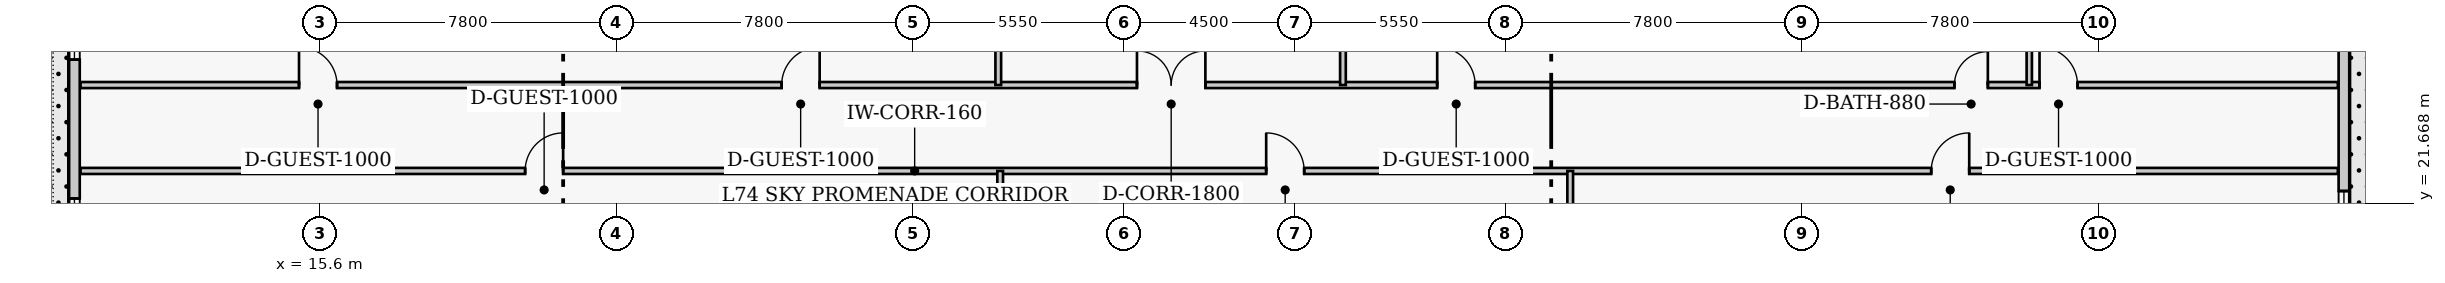
"""IFC4 building model, lengths in metres.
Left out: names, types, materials, properties, quantities, classifications, styles, units other than length and angle.
Written with IfcOpenShell. Run it as: python <this file> out.ifc"""

import sys

from ifc_helpers import new_model, si_unit, direction, frame, frame_2d, origin, place, context, subcontext, project, spatial, rectangle, extrude, element, fill, save


model = new_model("IFC4")
c1 = context("Model", 3, precision=1e-05, world=origin(), true_north=direction((0.0, 1.0)))
c2 = subcontext(c1, "Body", "Model", "MODEL_VIEW")
j1 = project(units=[si_unit("LENGTHUNIT", "METRE"), si_unit("PLANEANGLEUNIT", "RADIAN")], contexts=[c1])
p1 = place(None, origin())
s1 = spatial("IfcSite", under=j1, at=p1, CompositionType="ELEMENT")
p2 = place(p1, origin())
s2 = spatial("IfcBuilding", under=s1, at=p2, CompositionType="ELEMENT")
p3 = place(p2, frame((0.0, 0.0, 297.4)))
s3 = spatial("IfcBuildingStorey", under=s2, at=p3, CompositionType="ELEMENT", Elevation=297.4)
p4 = place(p3, frame((68.86, 14.76, 0.0), z_axis=(0.0, 0.0, 1.0), x_axis=(0.0, 1.0, 0.0)))
e1 = element("IfcWall", 1, at=p4, inside=s3, PredefinedType="SOLIDWALL", context=c2, shape_type="SweptSolid", body=[
    extrude(rectangle(XDim=27.68, YDim=0.28, at=frame_2d((13.84, 0.0))), origin(), (0.0, 0.0, 1.0), 4.31),
])
p5 = place(p4, frame((0.677, 0.0, 0.65)))
e2 = element("IfcOpeningElement", 2, at=p5, cuts=e1, PredefinedType="OPENING", context=c2, shape_type="SweptSolid", body=[
    extrude(rectangle(XDim=2.6, YDim=2.2, at=frame_2d((1.3, 1.1))), frame((0.0, 0.15, 0.0), z_axis=(0.0, -1.0, 0.0), x_axis=(1.0, 0.0, 0.0)), (0.0, 0.0, 1.0), 0.3),
])
p6 = place(p4, frame((4.631, 0.0, 0.65)))
e3 = element("IfcOpeningElement", 3, at=p6, cuts=e1, PredefinedType="OPENING", context=c2, shape_type="SweptSolid", body=[
    extrude(rectangle(XDim=2.6, YDim=2.2, at=frame_2d((1.3, 1.1))), frame((0.0, 0.15, 0.0), z_axis=(0.0, -1.0, 0.0), x_axis=(1.0, 0.0, 0.0)), (0.0, 0.0, 1.0), 0.3),
])
p7 = place(p4, frame((12.54, 0.0, 0.65)))
e4 = element("IfcOpeningElement", 4, at=p7, cuts=e1, PredefinedType="OPENING", context=c2, shape_type="SweptSolid", body=[
    extrude(rectangle(XDim=2.6, YDim=2.2, at=frame_2d((1.3, 1.1))), frame((0.0, 0.15, 0.0), z_axis=(0.0, -1.0, 0.0), x_axis=(1.0, 0.0, 0.0)), (0.0, 0.0, 1.0), 0.3),
])
p8 = place(p4, frame((16.494, 0.0, 0.65)))
e5 = element("IfcOpeningElement", 5, at=p8, cuts=e1, PredefinedType="OPENING", context=c2, shape_type="SweptSolid", body=[
    extrude(rectangle(XDim=2.6, YDim=2.2, at=frame_2d((1.3, 1.1))), frame((0.0, 0.15, 0.0), z_axis=(0.0, -1.0, 0.0), x_axis=(1.0, 0.0, 0.0)), (0.0, 0.0, 1.0), 0.3),
])
p9 = place(p4, frame((20.448, 0.0, 0.65)))
e6 = element("IfcOpeningElement", 6, at=p9, cuts=e1, PredefinedType="OPENING", context=c2, shape_type="SweptSolid", body=[
    extrude(rectangle(XDim=2.6, YDim=2.2, at=frame_2d((1.3, 1.1))), frame((0.0, 0.15, 0.0), z_axis=(0.0, -1.0, 0.0), x_axis=(1.0, 0.0, 0.0)), (0.0, 0.0, 1.0), 0.3),
])
p10 = place(p4, frame((24.403, 0.0, 0.65)))
e7 = element("IfcOpeningElement", 7, at=p10, cuts=e1, PredefinedType="OPENING", context=c2, shape_type="SweptSolid", body=[
    extrude(rectangle(XDim=2.6, YDim=2.2, at=frame_2d((1.3, 1.1))), frame((0.0, 0.15, 0.0), z_axis=(0.0, -1.0, 0.0), x_axis=(1.0, 0.0, 0.0)), (0.0, 0.0, 1.0), 0.3),
])
p11 = place(p3, frame((9.14, 39.44, 0.0), z_axis=(0.0, 0.0, 1.0), x_axis=(0.0, -1.0, 0.0)))
e8 = element("IfcWall", 8, at=p11, inside=s3, PredefinedType="SOLIDWALL", context=c2, shape_type="SweptSolid", body=[
    extrude(rectangle(XDim=27.68, YDim=0.28, at=frame_2d((13.84, 0.0))), origin(), (0.0, 0.0, 1.0), 4.31),
])
p12 = place(p11, frame((0.677, 0.0, 0.65)))
e9 = element("IfcOpeningElement", 9, at=p12, cuts=e8, PredefinedType="OPENING", context=c2, shape_type="SweptSolid", body=[
    extrude(rectangle(XDim=2.6, YDim=2.2, at=frame_2d((1.3, 1.1))), frame((0.0, 0.15, 0.0), z_axis=(0.0, -1.0, 0.0), x_axis=(1.0, 0.0, 0.0)), (0.0, 0.0, 1.0), 0.3),
])
p13 = place(p11, frame((4.631, 0.0, 0.65)))
e10 = element("IfcOpeningElement", 10, at=p13, cuts=e8, PredefinedType="OPENING", context=c2, shape_type="SweptSolid", body=[
    extrude(rectangle(XDim=2.6, YDim=2.2, at=frame_2d((1.3, 1.1))), frame((0.0, 0.15, 0.0), z_axis=(0.0, -1.0, 0.0), x_axis=(1.0, 0.0, 0.0)), (0.0, 0.0, 1.0), 0.3),
])
p14 = place(p11, frame((8.586, 0.0, 0.65)))
e11 = element("IfcOpeningElement", 11, at=p14, cuts=e8, PredefinedType="OPENING", context=c2, shape_type="SweptSolid", body=[
    extrude(rectangle(XDim=2.6, YDim=2.2, at=frame_2d((1.3, 1.1))), frame((0.0, 0.15, 0.0), z_axis=(0.0, -1.0, 0.0), x_axis=(1.0, 0.0, 0.0)), (0.0, 0.0, 1.0), 0.3),
])
p15 = place(p11, frame((11.39, 0.0, 0.65)))
e12 = element("IfcOpeningElement", 12, at=p15, cuts=e8, PredefinedType="OPENING", context=c2, shape_type="SweptSolid", body=[
    extrude(rectangle(XDim=2.6, YDim=2.2, at=frame_2d((1.3, 1.1))), frame((0.0, 0.15, 0.0), z_axis=(0.0, -1.0, 0.0), x_axis=(1.0, 0.0, 0.0)), (0.0, 0.0, 1.0), 0.3),
])
p16 = place(p11, frame((17.644, 0.0, 0.65)))
e13 = element("IfcOpeningElement", 13, at=p16, cuts=e8, PredefinedType="OPENING", context=c2, shape_type="SweptSolid", body=[
    extrude(rectangle(XDim=2.6, YDim=2.2, at=frame_2d((1.3, 1.1))), frame((0.0, 0.15, 0.0), z_axis=(0.0, -1.0, 0.0), x_axis=(1.0, 0.0, 0.0)), (0.0, 0.0, 1.0), 0.3),
])
p17 = place(p11, frame((20.448, 0.0, 0.65)))
e14 = element("IfcOpeningElement", 14, at=p17, cuts=e8, PredefinedType="OPENING", context=c2, shape_type="SweptSolid", body=[
    extrude(rectangle(XDim=2.6, YDim=2.2, at=frame_2d((1.3, 1.1))), frame((0.0, 0.15, 0.0), z_axis=(0.0, -1.0, 0.0), x_axis=(1.0, 0.0, 0.0)), (0.0, 0.0, 1.0), 0.3),
])
p18 = place(p11, frame((24.403, 0.0, 0.65)))
e15 = element("IfcOpeningElement", 15, at=p18, cuts=e8, PredefinedType="OPENING", context=c2, shape_type="SweptSolid", body=[
    extrude(rectangle(XDim=2.6, YDim=2.2, at=frame_2d((1.3, 1.1))), frame((0.0, 0.15, 0.0), z_axis=(0.0, -1.0, 0.0), x_axis=(1.0, 0.0, 0.0)), (0.0, 0.0, 1.0), 0.3),
])
p19 = place(p3, frame((9.3, 22.52, 0.0), z_axis=(0.0, 0.0, 1.0), x_axis=(1.0, 0.0, 0.0)))
e16 = element("IfcWall", 16, at=p19, inside=s3, PredefinedType="PARTITIONING", context=c2, shape_type="SweptSolid", body=[
    extrude(rectangle(XDim=59.4, YDim=0.16, at=frame_2d((29.7, 0.0))), origin(), (0.0, 0.0, 1.0), 4.31),
])
p20 = place(p19, frame((11.7, 0.0, 0.0)))
e17 = element("IfcOpeningElement", 17, at=p20, cuts=e16, PredefinedType="OPENING", context=c2, shape_type="SweptSolid", body=[
    extrude(rectangle(XDim=1.0, YDim=2.15, at=frame_2d((0.5, 1.075))), frame((0.0, 0.09, 0.0), z_axis=(0.0, -1.0, 0.0), x_axis=(1.0, 0.0, 0.0)), (0.0, 0.0, 1.0), 0.18),
])
p21 = place(p19, frame((31.2, 0.0, 0.0)))
e18 = element("IfcOpeningElement", 18, at=p21, cuts=e16, PredefinedType="OPENING", context=c2, shape_type="SweptSolid", body=[
    extrude(rectangle(XDim=1.0, YDim=2.15, at=frame_2d((0.5, 1.075))), frame((0.0, 0.09, 0.0), z_axis=(0.0, -1.0, 0.0), x_axis=(1.0, 0.0, 0.0)), (0.0, 0.0, 1.0), 0.18),
])
p22 = place(p19, frame((48.7, 0.0, 0.0)))
e19 = element("IfcOpeningElement", 19, at=p22, cuts=e16, PredefinedType="OPENING", context=c2, shape_type="SweptSolid", body=[
    extrude(rectangle(XDim=1.0, YDim=2.15, at=frame_2d((0.5, 1.075))), frame((0.0, 0.09, 0.0), z_axis=(0.0, -1.0, 0.0), x_axis=(1.0, 0.0, 0.0)), (0.0, 0.0, 1.0), 0.18),
])
p23 = place(p3, frame((9.3, 24.78, 0.0), z_axis=(0.0, 0.0, 1.0), x_axis=(1.0, 0.0, 0.0)))
e20 = element("IfcWall", 20, at=p23, inside=s3, PredefinedType="PARTITIONING", context=c2, shape_type="SweptSolid", body=[
    extrude(rectangle(XDim=59.4, YDim=0.16, at=frame_2d((29.7, 0.0))), origin(), (0.0, 0.0, 1.0), 4.31),
])
p24 = place(p23, frame((27.8, 0.0, 0.0)))
e21 = element("IfcOpeningElement", 21, at=p24, cuts=e20, PredefinedType="OPENING", context=c2, shape_type="SweptSolid", body=[
    extrude(rectangle(XDim=1.8, YDim=2.2, at=frame_2d((0.9, 1.1))), frame((0.0, 0.09, 0.0), z_axis=(0.0, -1.0, 0.0), x_axis=(1.0, 0.0, 0.0)), (0.0, 0.0, 1.0), 0.18),
])
p25 = place(p23, frame((18.45, 0.0, 0.0)))
e22 = element("IfcOpeningElement", 22, at=p25, cuts=e20, PredefinedType="OPENING", context=c2, shape_type="SweptSolid", body=[
    extrude(rectangle(XDim=1.0, YDim=2.15, at=frame_2d((0.5, 1.075))), frame((0.0, 0.09, 0.0), z_axis=(0.0, -1.0, 0.0), x_axis=(1.0, 0.0, 0.0)), (0.0, 0.0, 1.0), 0.18),
])
p26 = place(p23, frame((35.7, 0.0, 0.0)))
e23 = element("IfcOpeningElement", 23, at=p26, cuts=e20, PredefinedType="OPENING", context=c2, shape_type="SweptSolid", body=[
    extrude(rectangle(XDim=1.0, YDim=2.15, at=frame_2d((0.5, 1.075))), frame((0.0, 0.09, 0.0), z_axis=(0.0, -1.0, 0.0), x_axis=(1.0, 0.0, 0.0)), (0.0, 0.0, 1.0), 0.18),
])
p27 = place(p23, frame((5.75, 0.0, 0.0)))
e24 = element("IfcOpeningElement", 24, at=p27, cuts=e20, PredefinedType="OPENING", context=c2, shape_type="SweptSolid", body=[
    extrude(rectangle(XDim=1.0, YDim=2.15, at=frame_2d((0.5, 1.075))), frame((0.0, 0.09, 0.0), z_axis=(0.0, -1.0, 0.0), x_axis=(1.0, 0.0, 0.0)), (0.0, 0.0, 1.0), 0.18),
])
p28 = place(p23, frame((49.31, 0.0, 0.0)))
e25 = element("IfcOpeningElement", 25, at=p28, cuts=e20, PredefinedType="OPENING", context=c2, shape_type="SweptSolid", body=[
    extrude(rectangle(XDim=0.88, YDim=2.05, at=frame_2d((0.44, 1.025))), frame((0.0, 0.09, 0.0), z_axis=(0.0, -1.0, 0.0), x_axis=(1.0, 0.0, 0.0)), (0.0, 0.0, 1.0), 0.18),
])
p29 = place(p23, frame((51.55, 0.0, 0.0)))
e26 = element("IfcOpeningElement", 26, at=p29, cuts=e20, PredefinedType="OPENING", context=c2, shape_type="SweptSolid", body=[
    extrude(rectangle(XDim=1.0, YDim=2.15, at=frame_2d((0.5, 1.075))), frame((0.0, 0.09, 0.0), z_axis=(0.0, -1.0, 0.0), x_axis=(1.0, 0.0, 0.0)), (0.0, 0.0, 1.0), 0.18),
])
for number, where, z_axis, x_axis in (
    (27, (33.45, 24.78, 0.0), (0.0, 0.0, 1.0), (0.0, 1.0, 0.0)),
    (28, (42.52, 24.78, 0.0), (0.0, 0.0, 1.0), (0.0, 1.0, 0.0)),
):
    element("IfcWall", number, at=place(p3, frame(where, z_axis=z_axis, x_axis=x_axis)), inside=s3, PredefinedType="PARTITIONING", context=c2, shape_type="SweptSolid", body=[
        extrude(rectangle(XDim=4.77, YDim=0.15, at=frame_2d((2.385, 0.0))), origin(), (0.0, 0.0, 1.0), 4.31),
    ])
p30 = place(p3, frame((33.5, 8.2, 0.0), z_axis=(0.0, 0.0, 1.0), x_axis=(0.0, 1.0, 0.0)))
e29 = element("IfcWall", 29, at=p30, inside=s3, PredefinedType="PARTITIONING", context=c2, shape_type="SweptSolid", body=[
    extrude(rectangle(XDim=14.32, YDim=0.15, at=frame_2d((7.16, 0.0))), origin(), (0.0, 0.0, 1.0), 4.31),
])
p31 = place(p3, frame((48.5, 9.72, 0.0), z_axis=(0.0, 0.0, 1.0), x_axis=(0.0, 1.0, 0.0)))
e30 = element("IfcWall", 30, at=p31, inside=s3, PredefinedType="PARTITIONING", context=c2, shape_type="SweptSolid", body=[
    extrude(rectangle(XDim=12.8, YDim=0.15, at=frame_2d((6.4, 0.0))), origin(), (0.0, 0.0, 1.0), 3.906),
])
p32 = place(p3, frame((60.58, 24.78, 0.0), z_axis=(0.0, 0.0, 1.0), x_axis=(0.0, 1.0, 0.0)))
e31 = element("IfcWall", 31, at=p32, inside=s3, PredefinedType="PLUMBINGWALL", context=c2, shape_type="SweptSolid", body=[
    extrude(rectangle(XDim=7.32, YDim=0.14, at=frame_2d((3.66, 0.0))), origin(), (0.0, 0.0, 1.0), 4.31),
])
p33 = place(p6, origin())
e32 = element("IfcWindow", 32, at=p33, inside=s3, PartitioningType="SINGLE_PANEL", PredefinedType="WINDOW", context=c2, shape_type="SweptSolid", body=[
    extrude(rectangle(XDim=2.6, YDim=2.2, at=frame_2d((1.3, 1.1))), frame((0.0, 0.03, 0.0), z_axis=(0.0, -1.0, 0.0), x_axis=(1.0, 0.0, 0.0)), (0.0, 0.0, 1.0), 0.06),
])
fill(e3, e32)
p34 = place(p15, origin())
e33 = element("IfcWindow", 33, at=p34, inside=s3, PartitioningType="SINGLE_PANEL", PredefinedType="WINDOW", context=c2, shape_type="SweptSolid", body=[
    extrude(rectangle(XDim=2.6, YDim=2.2, at=frame_2d((1.3, 1.1))), frame((0.0, 0.03, 0.0), z_axis=(0.0, -1.0, 0.0), x_axis=(1.0, 0.0, 0.0)), (0.0, 0.0, 1.0), 0.06),
])
fill(e12, e33)
p35 = place(p16, origin())
e34 = element("IfcWindow", 34, at=p35, inside=s3, PartitioningType="SINGLE_PANEL", PredefinedType="WINDOW", context=c2, shape_type="SweptSolid", body=[
    extrude(rectangle(XDim=2.6, YDim=2.2, at=frame_2d((1.3, 1.1))), frame((0.0, 0.03, 0.0), z_axis=(0.0, -1.0, 0.0), x_axis=(1.0, 0.0, 0.0)), (0.0, 0.0, 1.0), 0.06),
])
fill(e13, e34)
p36 = place(p24, origin())
e35 = element("IfcDoor", 35, at=p36, inside=s3, OperationType="DOUBLE_DOOR_SINGLE_SWING", PredefinedType="DOOR", context=c2, shape_type="SweptSolid", body=[
    extrude(rectangle(XDim=1.8, YDim=2.2, at=frame_2d((0.9, 1.1))), frame((0.0, 0.025, 0.0), z_axis=(0.0, -1.0, 0.0), x_axis=(1.0, 0.0, 0.0)), (0.0, 0.0, 1.0), 0.05),
])
fill(e21, e35)
p37 = place(p25, origin())
e36 = element("IfcDoor", 36, at=p37, inside=s3, OperationType="SINGLE_SWING_RIGHT", PredefinedType="DOOR", context=c2, shape_type="SweptSolid", body=[
    extrude(rectangle(XDim=1.0, YDim=2.15, at=frame_2d((0.5, 1.075))), frame((0.0, 0.025, 0.0), z_axis=(0.0, -1.0, 0.0), x_axis=(1.0, 0.0, 0.0)), (0.0, 0.0, 1.0), 0.05),
])
fill(e22, e36)
p38 = place(p26, origin())
e37 = element("IfcDoor", 37, at=p38, inside=s3, OperationType="SINGLE_SWING_LEFT", PredefinedType="DOOR", context=c2, shape_type="SweptSolid", body=[
    extrude(rectangle(XDim=1.0, YDim=2.15, at=frame_2d((0.5, 1.075))), frame((0.0, 0.025, 0.0), z_axis=(0.0, -1.0, 0.0), x_axis=(1.0, 0.0, 0.0)), (0.0, 0.0, 1.0), 0.05),
])
fill(e23, e37)
p39 = place(p20, origin())
e38 = element("IfcDoor", 38, at=p39, inside=s3, OperationType="SINGLE_SWING_RIGHT", PredefinedType="DOOR", context=c2, shape_type="SweptSolid", body=[
    extrude(rectangle(XDim=1.0, YDim=2.15, at=frame_2d((0.5, 1.075))), frame((0.0, 0.025, 0.0), z_axis=(0.0, -1.0, 0.0), x_axis=(1.0, 0.0, 0.0)), (0.0, 0.0, 1.0), 0.05),
])
fill(e17, e38)
p40 = place(p21, origin())
e39 = element("IfcDoor", 39, at=p40, inside=s3, OperationType="SINGLE_SWING_LEFT", PredefinedType="DOOR", context=c2, shape_type="SweptSolid", body=[
    extrude(rectangle(XDim=1.0, YDim=2.15, at=frame_2d((0.5, 1.075))), frame((0.0, 0.025, 0.0), z_axis=(0.0, -1.0, 0.0), x_axis=(1.0, 0.0, 0.0)), (0.0, 0.0, 1.0), 0.05),
])
fill(e18, e39)
p41 = place(p22, origin())
e40 = element("IfcDoor", 40, at=p41, inside=s3, OperationType="SINGLE_SWING_RIGHT", PredefinedType="DOOR", context=c2, shape_type="SweptSolid", body=[
    extrude(rectangle(XDim=1.0, YDim=2.15, at=frame_2d((0.5, 1.075))), frame((0.0, 0.025, 0.0), z_axis=(0.0, -1.0, 0.0), x_axis=(1.0, 0.0, 0.0)), (0.0, 0.0, 1.0), 0.05),
])
fill(e19, e40)
p42 = place(p27, origin())
e41 = element("IfcDoor", 41, at=p42, inside=s3, OperationType="SINGLE_SWING_LEFT", PredefinedType="DOOR", context=c2, shape_type="SweptSolid", body=[
    extrude(rectangle(XDim=1.0, YDim=2.15, at=frame_2d((0.5, 1.075))), frame((0.0, 0.025, 0.0), z_axis=(0.0, -1.0, 0.0), x_axis=(1.0, 0.0, 0.0)), (0.0, 0.0, 1.0), 0.05),
])
fill(e24, e41)
p43 = place(p28, origin())
e42 = element("IfcDoor", 42, at=p43, inside=s3, OperationType="SINGLE_SWING_RIGHT", PredefinedType="DOOR", context=c2, shape_type="SweptSolid", body=[
    extrude(rectangle(XDim=0.88, YDim=2.05, at=frame_2d((0.44, 1.025))), frame((0.0, 0.025, 0.0), z_axis=(0.0, -1.0, 0.0), x_axis=(1.0, 0.0, 0.0)), (0.0, 0.0, 1.0), 0.05),
])
fill(e25, e42)
p44 = place(p29, origin())
e43 = element("IfcDoor", 43, at=p44, inside=s3, OperationType="SINGLE_SWING_LEFT", PredefinedType="DOOR", context=c2, shape_type="SweptSolid", body=[
    extrude(rectangle(XDim=1.0, YDim=2.15, at=frame_2d((0.5, 1.075))), frame((0.0, 0.025, 0.0), z_axis=(0.0, -1.0, 0.0), x_axis=(1.0, 0.0, 0.0)), (0.0, 0.0, 1.0), 0.05),
])
fill(e26, e43)
save(model, sys.argv[1])
